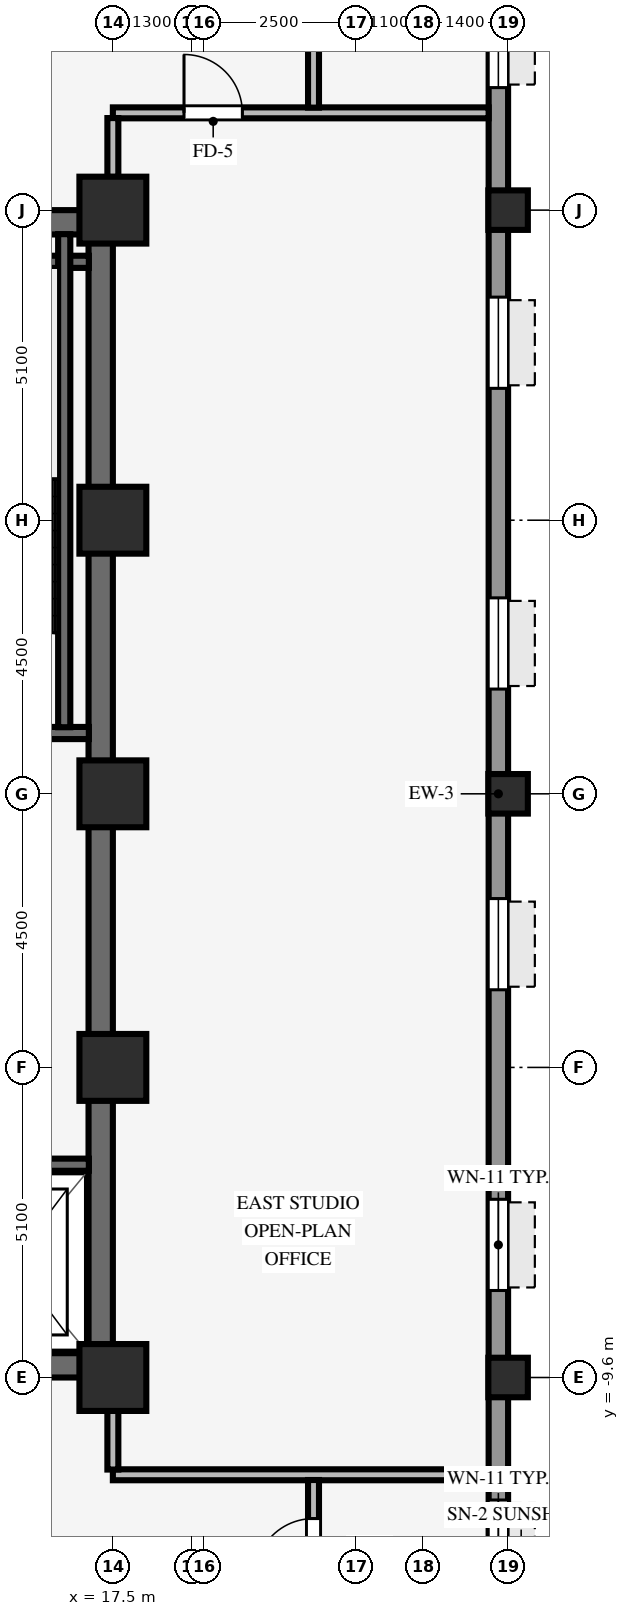
"""IFC4 building model, lengths in metres.
Left out: names, types, materials, properties, quantities, classifications, styles, units other than length and angle.
Written with IfcOpenShell. Run it as: python <this file> out.ifc"""

import sys

from ifc_helpers import new_model, si_unit, direction, frame, frame_2d, origin, origin_2d, place, context, subcontext, project, spatial, rectangle, hollow_rectangle, extrude, source, transform, mapped, element, fill, save


model = new_model("IFC4")
c1 = context("Model", 3, precision=1e-05, world=origin(), true_north=direction((0.0, 1.0)))
c2 = subcontext(c1, "Body", "Model", "MODEL_VIEW")
j1 = project(units=[si_unit("LENGTHUNIT", "METRE"), si_unit("PLANEANGLEUNIT", "RADIAN")], contexts=[c1])
p1 = place(None, origin())
s1 = spatial("IfcSite", under=j1, at=p1, CompositionType="ELEMENT")
p2 = place(p1, origin())
s2 = spatial("IfcBuilding", under=s1, at=p2, CompositionType="ELEMENT")
p3 = place(p2, frame((0.0, 0.0, 105.6)))
s3 = spatial("IfcBuildingStorey", under=s2, at=p3, CompositionType="ELEMENT", Elevation=105.6)
for number, where, z_axis, x_axis in (
    (1, (9.0, -9.4, 0.0), (0.0, 0.0, 1.0), (1.0, 0.0, 0.0)),
    (2, (9.0, 9.4, 0.0), (0.0, 0.0, 1.0), (1.0, 0.0, 0.0)),
):
    element("IfcWall", number, at=place(p3, frame(where, z_axis=z_axis, x_axis=x_axis)), inside=s3, PredefinedType="SHEAR", context=c2, shape_type="SweptSolid", body=[
        extrude(rectangle(XDim=8.5, YDim=0.4, at=frame_2d((4.25, 0.0))), origin(), (0.0, 0.0, 1.0), 3.37),
    ])
p4 = place(p3, frame((17.3, -9.205, 0.0), z_axis=(0.0, 0.0, 1.0), x_axis=(0.0, 1.0, 0.0)))
e3 = element("IfcWall", 3, at=p4, inside=s3, PredefinedType="SHEAR", context=c2, shape_type="SweptSolid", body=[
    extrude(rectangle(XDim=18.41, YDim=0.4, at=frame_2d((9.205, 0.0))), origin(), (0.0, 0.0, 1.0), 3.37),
])
for number, where, z_axis, x_axis in (
    (4, (17.5, -9.6, 0.0), (0.0, 0.0, 1.0), (1.0, 0.0, 0.0)),
    (5, (17.5, -4.5, 0.0), (0.0, 0.0, 1.0), (1.0, 0.0, 0.0)),
    (6, (17.5, 4.5, 0.0), (0.0, 0.0, 1.0), (1.0, 0.0, 0.0)),
    (7, (17.5, 9.6, 0.0), (0.0, 0.0, 1.0), (1.0, 0.0, 0.0)),
    (8, (17.5, 0.0, 0.0), (0.0, 0.0, 1.0), (1.0, 0.0, 0.0)),
):
    element("IfcColumn", number, at=place(p3, frame(where, z_axis=z_axis, x_axis=x_axis)), inside=s3, PredefinedType="COLUMN", context=c2, shape_type="SweptSolid", body=[
        extrude(rectangle(XDim=1.1, YDim=1.1, at=origin_2d()), origin(), (0.0, 0.0, 1.0), 3.37),
    ])
for number, where, z_axis, x_axis in (
    (9, (24.0, -9.6, 0.0), (0.0, 0.0, 1.0), (1.0, 0.0, 0.0)),
    (10, (24.0, 0.0, 0.0), (0.0, 0.0, 1.0), (1.0, 0.0, 0.0)),
    (11, (24.0, 9.6, 0.0), (0.0, 0.0, 1.0), (1.0, 0.0, 0.0)),
):
    element("IfcColumn", number, at=place(p3, frame(where, z_axis=z_axis, x_axis=x_axis)), inside=s3, PredefinedType="COLUMN", context=c2, shape_type="SweptSolid", body=[
        extrude(hollow_rectangle(XDim=0.65, YDim=0.65, WallThickness=0.04, InnerFilletRadius=0.04, OuterFilletRadius=0.08, at=origin_2d()), origin(), (0.0, 0.0, 1.0), 3.37),
    ])
p5 = place(p3, frame((23.84, -20.784, 0.0), z_axis=(0.0, 0.0, 1.0), x_axis=(0.0, 1.0, 0.0)))
e12 = element("IfcWall", 12, at=p5, inside=s3, PredefinedType="STANDARD", context=c2, shape_type="SweptSolid", body=[
    extrude(rectangle(XDim=41.568, YDim=0.32, at=frame_2d((20.784, 0.0))), origin(), (0.0, 0.0, 1.0), 2.705),
])
p6 = place(p5, frame((1.373, 0.0, 0.8)))
e13 = element("IfcOpeningElement", 13, at=p6, cuts=e12, PredefinedType="OPENING", context=c2, shape_type="SweptSolid", body=[
    extrude(rectangle(XDim=1.5, YDim=1.6, at=frame_2d((0.75, 0.8))), frame((0.0, 0.17, 0.0), z_axis=(0.0, -1.0, 0.0), x_axis=(1.0, 0.0, 0.0)), (0.0, 0.0, 1.0), 0.34),
])
p7 = place(p5, frame((7.669, 0.0, 0.8)))
e14 = element("IfcOpeningElement", 14, at=p7, cuts=e12, PredefinedType="OPENING", context=c2, shape_type="SweptSolid", body=[
    extrude(rectangle(XDim=1.5, YDim=1.6, at=frame_2d((0.75, 0.8))), frame((0.0, 0.17, 0.0), z_axis=(0.0, -1.0, 0.0), x_axis=(1.0, 0.0, 0.0)), (0.0, 0.0, 1.0), 0.34),
])
p8 = place(p5, frame((12.615, 0.0, 0.8)))
e15 = element("IfcOpeningElement", 15, at=p8, cuts=e12, PredefinedType="OPENING", context=c2, shape_type="SweptSolid", body=[
    extrude(rectangle(XDim=1.5, YDim=1.6, at=frame_2d((0.75, 0.8))), frame((0.0, 0.17, 0.0), z_axis=(0.0, -1.0, 0.0), x_axis=(1.0, 0.0, 0.0)), (0.0, 0.0, 1.0), 0.34),
])
p9 = place(p5, frame((17.561, 0.0, 0.8)))
e16 = element("IfcOpeningElement", 16, at=p9, cuts=e12, PredefinedType="OPENING", context=c2, shape_type="SweptSolid", body=[
    extrude(rectangle(XDim=1.5, YDim=1.6, at=frame_2d((0.75, 0.8))), frame((0.0, 0.17, 0.0), z_axis=(0.0, -1.0, 0.0), x_axis=(1.0, 0.0, 0.0)), (0.0, 0.0, 1.0), 0.34),
])
p10 = place(p5, frame((22.507, 0.0, 0.8)))
e17 = element("IfcOpeningElement", 17, at=p10, cuts=e12, PredefinedType="OPENING", context=c2, shape_type="SweptSolid", body=[
    extrude(rectangle(XDim=1.5, YDim=1.6, at=frame_2d((0.75, 0.8))), frame((0.0, 0.17, 0.0), z_axis=(0.0, -1.0, 0.0), x_axis=(1.0, 0.0, 0.0)), (0.0, 0.0, 1.0), 0.34),
])
p11 = place(p5, frame((27.453, 0.0, 0.8)))
e18 = element("IfcOpeningElement", 18, at=p11, cuts=e12, PredefinedType="OPENING", context=c2, shape_type="SweptSolid", body=[
    extrude(rectangle(XDim=1.5, YDim=1.6, at=frame_2d((0.75, 0.8))), frame((0.0, 0.17, 0.0), z_axis=(0.0, -1.0, 0.0), x_axis=(1.0, 0.0, 0.0)), (0.0, 0.0, 1.0), 0.34),
])
p12 = place(p5, frame((32.399, 0.0, 0.8)))
e19 = element("IfcOpeningElement", 19, at=p12, cuts=e12, PredefinedType="OPENING", context=c2, shape_type="SweptSolid", body=[
    extrude(rectangle(XDim=1.5, YDim=1.6, at=frame_2d((0.75, 0.8))), frame((0.0, 0.17, 0.0), z_axis=(0.0, -1.0, 0.0), x_axis=(1.0, 0.0, 0.0)), (0.0, 0.0, 1.0), 0.34),
])
p13 = place(p5, frame((38.695, 0.0, 0.8)))
e20 = element("IfcOpeningElement", 20, at=p13, cuts=e12, PredefinedType="OPENING", context=c2, shape_type="SweptSolid", body=[
    extrude(rectangle(XDim=1.5, YDim=1.6, at=frame_2d((0.75, 0.8))), frame((0.0, 0.17, 0.0), z_axis=(0.0, -1.0, 0.0), x_axis=(1.0, 0.0, 0.0)), (0.0, 0.0, 1.0), 0.34),
])
for number, where, z_axis, x_axis in (
    (21, (13.535, 1.0, 0.0), (0.0, 0.0, 1.0), (1.0, 0.0, 0.0)),
    (22, (13.535, 8.75, 0.0), (0.0, 0.0, 1.0), (1.0, 0.0, 0.0)),
):
    element("IfcWall", number, at=place(p3, frame(where, z_axis=z_axis, x_axis=x_axis)), inside=s3, PredefinedType="SHEAR", context=c2, shape_type="SweptSolid", body=[
        extrude(rectangle(XDim=3.57, YDim=0.2, at=frame_2d((1.785, 0.0))), origin(), (0.0, 0.0, 1.0), 3.37),
    ])
p14 = place(p3, frame((16.7, 1.095, 0.0), z_axis=(0.0, 0.0, 1.0), x_axis=(0.0, 1.0, 0.0)))
e23 = element("IfcWall", 23, at=p14, inside=s3, PredefinedType="SHEAR", context=c2, shape_type="SweptSolid", body=[
    extrude(rectangle(XDim=8.11, YDim=0.2, at=frame_2d((4.055, 0.0))), origin(), (0.0, 0.0, 1.0), 3.37),
])
p15 = place(p3, frame((14.645, -6.1, 0.0), z_axis=(0.0, 0.0, 1.0), x_axis=(1.0, 0.0, 0.0)))
e24 = element("IfcWall", 24, at=p15, inside=s3, PredefinedType="SHEAR", context=c2, shape_type="SweptSolid", body=[
    extrude(rectangle(XDim=2.46, YDim=0.2, at=frame_2d((1.23, 0.0))), origin(), (0.0, 0.0, 1.0), 3.37),
])
p16 = place(p3, frame((17.5, -11.2, 0.0), z_axis=(0.0, 0.0, 1.0), x_axis=(1.0, 0.0, 0.0)))
e25 = element("IfcWall", 25, at=p16, inside=s3, PredefinedType="PARTITIONING", context=c2, shape_type="SweptSolid", body=[
    extrude(rectangle(XDim=6.18, YDim=0.18, at=frame_2d((3.09, 0.0))), origin(), (0.0, 0.0, 1.0), 3.36),
])
p17 = place(p3, frame((17.5, 11.2, 0.0), z_axis=(0.0, 0.0, 1.0), x_axis=(1.0, 0.0, 0.0)))
e26 = element("IfcWall", 26, at=p17, inside=s3, PredefinedType="PARTITIONING", context=c2, shape_type="SweptSolid", body=[
    extrude(rectangle(XDim=6.18, YDim=0.18, at=frame_2d((3.09, 0.0))), origin(), (0.0, 0.0, 1.0), 3.36),
])
p18 = place(p17, frame((1.17, 0.0, 0.0)))
e27 = element("IfcOpeningElement", 27, at=p18, cuts=e26, PredefinedType="OPENING", context=c2, shape_type="SweptSolid", body=[
    extrude(rectangle(XDim=0.96, YDim=2.1, at=frame_2d((0.48, 1.05))), frame((0.0, 0.1, 0.0), z_axis=(0.0, -1.0, 0.0), x_axis=(1.0, 0.0, 0.0)), (0.0, 0.0, 1.0), 0.2),
])
for number, where, z_axis, x_axis in (
    (28, (17.5, -11.114, 0.0), (0.0, 0.0, 1.0), (0.0, 1.0, 0.0)),
    (29, (17.5, 10.146, 0.0), (0.0, 0.0, 1.0), (0.0, 1.0, 0.0)),
):
    element("IfcWall", number, at=place(p3, frame(where, z_axis=z_axis, x_axis=x_axis)), inside=s3, PredefinedType="PARTITIONING", context=c2, shape_type="SweptSolid", body=[
        extrude(rectangle(XDim=0.968, YDim=0.18, at=frame_2d((0.484, 0.0))), origin(), (0.0, 0.0, 1.0), 2.738),
    ])
p19 = place(p3, frame((20.8, -13.514, 0.0), z_axis=(0.0, 0.0, 1.0), x_axis=(0.0, 1.0, 0.0)))
e30 = element("IfcWall", 30, at=p19, inside=s3, PredefinedType="PARTITIONING", context=c2, shape_type="SweptSolid", body=[
    extrude(rectangle(XDim=2.228, YDim=0.18, at=frame_2d((1.114, 0.0))), origin(), (0.0, 0.0, 1.0), 3.36),
])
p20 = place(p19, frame((0.634, 0.0, 0.0)))
e31 = element("IfcOpeningElement", 31, at=p20, cuts=e30, PredefinedType="OPENING", context=c2, shape_type="SweptSolid", body=[
    extrude(rectangle(XDim=0.96, YDim=2.1, at=frame_2d((0.48, 1.05))), frame((0.0, 0.1, 0.0), z_axis=(0.0, -1.0, 0.0), x_axis=(1.0, 0.0, 0.0)), (0.0, 0.0, 1.0), 0.2),
])
p21 = place(p3, frame((20.8, 11.286, 0.0), z_axis=(0.0, 0.0, 1.0), x_axis=(0.0, 1.0, 0.0)))
e32 = element("IfcWall", 32, at=p21, inside=s3, PredefinedType="PARTITIONING", context=c2, shape_type="SweptSolid", body=[
    extrude(rectangle(XDim=2.228, YDim=0.18, at=frame_2d((1.114, 0.0))), origin(), (0.0, 0.0, 1.0), 3.36),
])
m1 = source(origin(), c2, "Body", "SweptSolid", [
    extrude(rectangle(XDim=1.5, YDim=1.6, at=frame_2d((0.75, 0.8))), frame((0.0, 0.03, 0.0), z_axis=(0.0, -1.0, 0.0), x_axis=(1.0, 0.0, 0.0)), (0.0, 0.0, 1.0), 0.06),
])
p22 = place(p7, origin())
e33 = element("IfcWindow", 33, at=p22, inside=s3, PartitioningType="SINGLE_PANEL", PredefinedType="WINDOW", context=c2, shape_type="MappedRepresentation", body=[
    mapped(m1, transform((0.0, 0.0, 0.0), scale=1.0)),
])
fill(e14, e33)
p23 = place(p8, origin())
e34 = element("IfcWindow", 34, at=p23, inside=s3, PartitioningType="SINGLE_PANEL", PredefinedType="WINDOW", context=c2, shape_type="MappedRepresentation", body=[
    mapped(m1, transform((0.0, 0.0, 0.0), scale=1.0)),
])
fill(e15, e34)
p24 = place(p9, origin())
e35 = element("IfcWindow", 35, at=p24, inside=s3, PartitioningType="SINGLE_PANEL", PredefinedType="WINDOW", context=c2, shape_type="MappedRepresentation", body=[
    mapped(m1, transform((0.0, 0.0, 0.0), scale=1.0)),
])
fill(e16, e35)
p25 = place(p10, origin())
e36 = element("IfcWindow", 36, at=p25, inside=s3, PartitioningType="SINGLE_PANEL", PredefinedType="WINDOW", context=c2, shape_type="MappedRepresentation", body=[
    mapped(m1, transform((0.0, 0.0, 0.0), scale=1.0)),
])
fill(e17, e36)
p26 = place(p11, origin())
e37 = element("IfcWindow", 37, at=p26, inside=s3, PartitioningType="SINGLE_PANEL", PredefinedType="WINDOW", context=c2, shape_type="MappedRepresentation", body=[
    mapped(m1, transform((0.0, 0.0, 0.0), scale=1.0)),
])
fill(e18, e37)
p27 = place(p12, origin())
e38 = element("IfcWindow", 38, at=p27, inside=s3, PartitioningType="SINGLE_PANEL", PredefinedType="WINDOW", context=c2, shape_type="MappedRepresentation", body=[
    mapped(m1, transform((0.0, 0.0, 0.0), scale=1.0)),
])
fill(e19, e38)
m2 = source(origin(), c2, "Body", "SweptSolid", [
    extrude(rectangle(XDim=0.96, YDim=2.1, at=frame_2d((0.48, 1.05))), frame((0.0, 0.025, 0.0), z_axis=(0.0, -1.0, 0.0), x_axis=(1.0, 0.0, 0.0)), (0.0, 0.0, 1.0), 0.05),
])
p28 = place(p18, origin())
e39 = element("IfcDoor", 39, at=p28, inside=s3, OperationType="SINGLE_SWING_LEFT", PredefinedType="DOOR", context=c2, shape_type="MappedRepresentation", body=[
    mapped(m2, transform((0.0, 0.0, 0.0), scale=1.0)),
])
fill(e27, e39)
p29 = place(p20, origin())
e40 = element("IfcDoor", 40, at=p29, inside=s3, OperationType="SINGLE_SWING_LEFT", PredefinedType="DOOR", context=c2, shape_type="MappedRepresentation", body=[
    mapped(m2, transform((0.0, 0.0, 0.0), scale=1.0)),
])
fill(e31, e40)
save(model, sys.argv[1])
